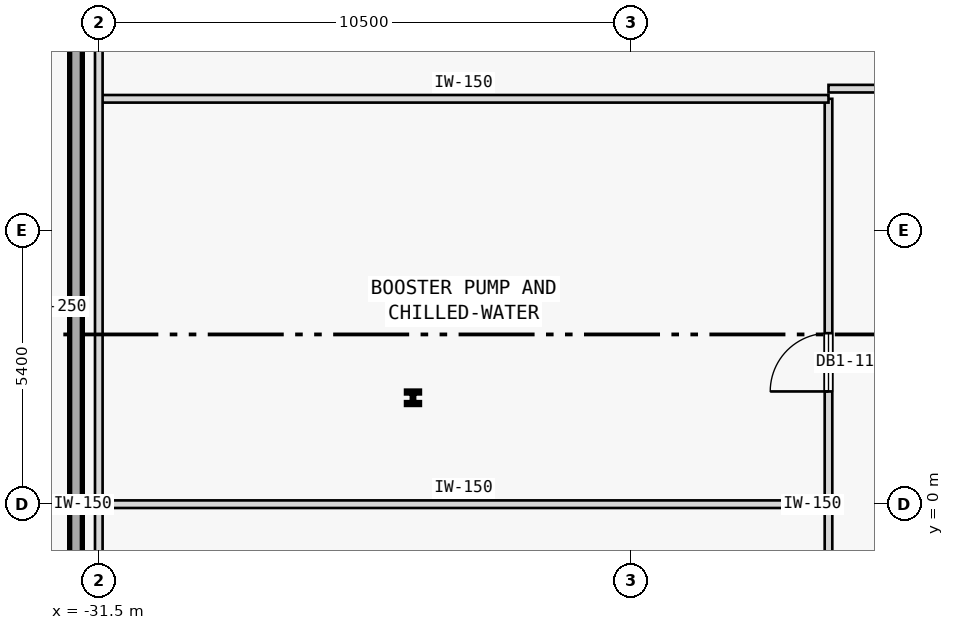
"""IFC4 building model, lengths in metres.
Left out: names, types, materials, properties, quantities, classifications, styles, units other than length and angle.
Written with IfcOpenShell. Run it as: python <this file> out.ifc"""

import sys

from ifc_helpers import new_model, si_unit, direction, frame, frame_2d, origin, origin_2d, place, context, subcontext, project, spatial, rectangle, i_section, extrude, element, fill, save


model = new_model("IFC4")
c1 = context("Model", 3, precision=1e-05, world=origin(), true_north=direction((0.0, 1.0)))
c2 = subcontext(c1, "Body", "Model", "MODEL_VIEW")
j1 = project(units=[si_unit("LENGTHUNIT", "METRE"), si_unit("PLANEANGLEUNIT", "RADIAN")], contexts=[c1])
p1 = place(None, origin())
s1 = spatial("IfcSite", under=j1, at=p1, CompositionType="ELEMENT")
p2 = place(p1, origin())
s2 = spatial("IfcBuilding", under=s1, at=p2, CompositionType="ELEMENT")
p3 = place(p2, frame((0.0, 0.0, -5.0)))
s3 = spatial("IfcBuildingStorey", under=s2, at=p3, CompositionType="ELEMENT", Elevation=-5.0)
p4 = place(p3, frame((-31.95, -16.0, 0.0), z_axis=(0.0, 0.0, 1.0), x_axis=(0.0, 1.0, 0.0)))
e1 = element("IfcWall", 1, at=p4, inside=s3, PredefinedType="SHEAR", context=c2, shape_type="SweptSolid", body=[
    extrude(rectangle(XDim=39.8, YDim=0.25, at=frame_2d((19.9, 0.0))), origin(), (0.0, 0.0, 1.0), 4.7),
])
p5 = place(p3, frame((-25.3, 2.1, 0.0), z_axis=(0.0, 0.0, 1.0), x_axis=(1.0, 0.0, 0.0)))
e2 = element("IfcColumn", 2, at=p5, inside=s3, PredefinedType="COLUMN", context=c2, shape_type="SweptSolid", body=[
    extrude(i_section(OverallWidth=0.259, OverallDepth=0.267, WebThickness=0.013, FlangeThickness=0.021, FilletRadius=0.013, at=origin_2d()), origin(), (0.0, 0.0, 1.0), 5.0),
])
p6 = place(p3, frame((-17.1, 8.2, 0.0), z_axis=(0.0, 0.0, 1.0), x_axis=(1.0, 0.0, 0.0)))
e3 = element("IfcWall", 3, at=p6, inside=s3, PredefinedType="PARTITIONING", context=c2, shape_type="SweptSolid", body=[
    extrude(rectangle(XDim=34.2, YDim=0.15, at=frame_2d((17.1, 0.0))), origin(), (0.0, 0.0, 1.0), 4.7),
])
p7 = place(p6, frame((16.3, 0.0, 0.0)))
e4 = element("IfcOpeningElement", 4, at=p7, cuts=e3, PredefinedType="OPENING", context=c2, shape_type="SweptSolid", body=[
    extrude(rectangle(XDim=1.6, YDim=2.15, at=frame_2d((0.8, 1.075))), frame((0.0, 0.085, 0.0), z_axis=(0.0, -1.0, 0.0), x_axis=(1.0, 0.0, 0.0)), (0.0, 0.0, 1.0), 0.17),
])
p8 = place(p3, frame((-17.1, -8.0, 0.0), z_axis=(0.0, 0.0, 1.0), x_axis=(0.0, 1.0, 0.0)))
e5 = element("IfcWall", 5, at=p8, inside=s3, PredefinedType="PARTITIONING", context=c2, shape_type="SweptSolid", body=[
    extrude(rectangle(XDim=8.0, YDim=0.15, at=frame_2d((4.0, 0.0))), origin(), (0.0, 0.0, 1.0), 4.7),
])
p9 = place(p8, frame((4.4, 0.0, 0.0)))
e6 = element("IfcOpeningElement", 6, at=p9, cuts=e5, PredefinedType="OPENING", context=c2, shape_type="SweptSolid", body=[
    extrude(rectangle(XDim=1.6, YDim=2.15, at=frame_2d((0.8, 1.075))), frame((0.0, 0.085, 0.0), z_axis=(0.0, -1.0, 0.0), x_axis=(1.0, 0.0, 0.0)), (0.0, 0.0, 1.0), 0.17),
])
p10 = place(p3, frame((-17.1, 0.0, 0.0), z_axis=(0.0, 0.0, 1.0), x_axis=(0.0, 1.0, 0.0)))
e7 = element("IfcWall", 7, at=p10, inside=s3, PredefinedType="PARTITIONING", context=c2, shape_type="SweptSolid", body=[
    extrude(rectangle(XDim=8.0, YDim=0.15, at=frame_2d((4.0, 0.0))), origin(), (0.0, 0.0, 1.0), 4.7),
])
p11 = place(p10, frame((2.225, 0.0, 0.0)))
e8 = element("IfcOpeningElement", 8, at=p11, cuts=e7, PredefinedType="OPENING", context=c2, shape_type="SweptSolid", body=[
    extrude(rectangle(XDim=1.15, YDim=2.15, at=frame_2d((0.575, 1.075))), frame((0.0, 0.085, 0.0), z_axis=(0.0, -1.0, 0.0), x_axis=(1.0, 0.0, 0.0)), (0.0, 0.0, 1.0), 0.17),
])
for number, where, z_axis, x_axis in (
    (9, (-31.5, 8.0, 0.0), (0.0, 0.0, 1.0), (1.0, 0.0, 0.0)),
    (10, (-31.5, 0.0, 0.0), (0.0, 0.0, 1.0), (1.0, 0.0, 0.0)),
):
    element("IfcWall", number, at=place(p3, frame(where, z_axis=z_axis, x_axis=x_axis)), inside=s3, PredefinedType="PARTITIONING", context=c2, shape_type="SweptSolid", body=[
        extrude(rectangle(XDim=14.4, YDim=0.15, at=frame_2d((7.2, 0.0))), origin(), (0.0, 0.0, 1.0), 4.7),
    ])
p12 = place(p3, frame((-31.5, -27.8, 0.0), z_axis=(0.0, 0.0, 1.0), x_axis=(0.0, 1.0, 0.0)))
e11 = element("IfcWall", 11, at=p12, inside=s3, PredefinedType="PARTITIONING", context=c2, shape_type="SweptSolid", body=[
    extrude(rectangle(XDim=55.6, YDim=0.15, at=frame_2d((27.8, 0.0))), origin(), (0.0, 0.0, 1.0), 4.7),
])
p13 = place(p11, origin())
e12 = element("IfcDoor", 12, at=p13, inside=s3, OperationType="SINGLE_SWING_LEFT", PredefinedType="DOOR", context=c2, shape_type="SweptSolid", body=[
    extrude(rectangle(XDim=1.15, YDim=2.15, at=frame_2d((0.575, 1.075))), frame((0.0, 0.025, 0.0), z_axis=(0.0, -1.0, 0.0), x_axis=(1.0, 0.0, 0.0)), (0.0, 0.0, 1.0), 0.05),
])
fill(e8, e12)
save(model, sys.argv[1])
